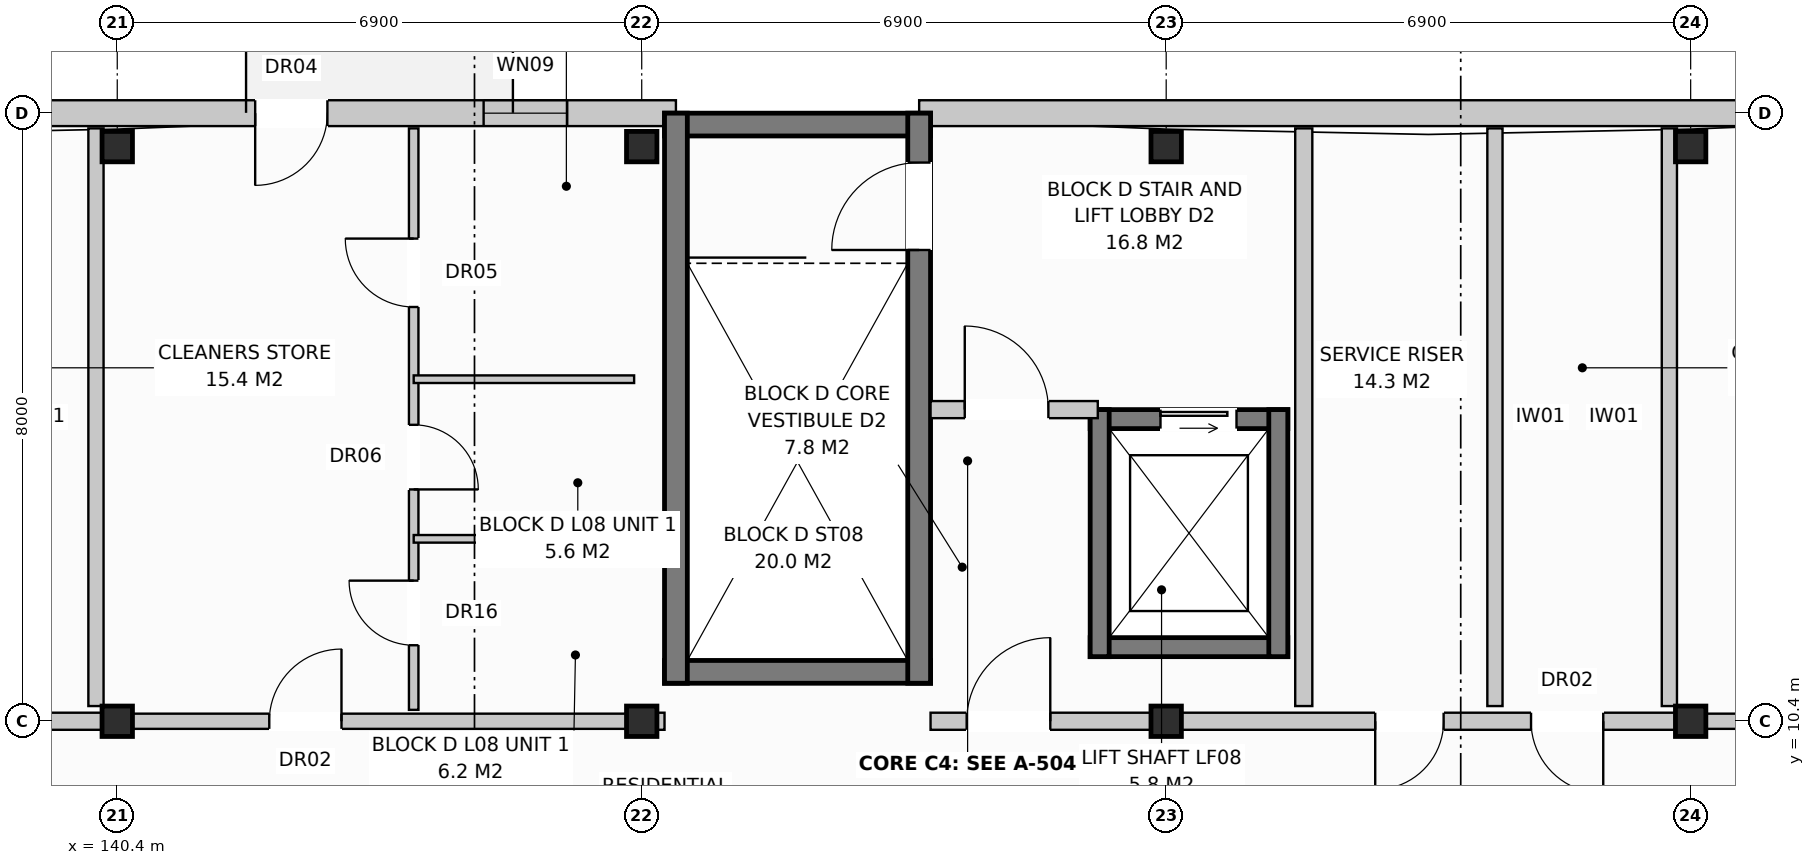
"""IFC4 building model, lengths in metres.
Left out: names, types, materials, properties, quantities, classifications, styles, units other than length and angle.
Written with IfcOpenShell. Run it as: python <this file> out.ifc"""

import sys

from ifc_helpers import new_model, si_unit, direction, frame, frame_2d, origin, origin_with_axes, origin_2d, place, context, subcontext, project, spatial, rectangle, extrude, element, fill, save


model = new_model("IFC4")
c1 = context("Model", 3, precision=1e-05, world=origin(), true_north=direction((0.0, 1.0)))
c2 = subcontext(c1, "Body", "Model", "MODEL_VIEW")
j1 = project(units=[si_unit("LENGTHUNIT", "METRE"), si_unit("PLANEANGLEUNIT", "RADIAN")], contexts=[c1])
p1 = place(None, origin())
s1 = spatial("IfcSite", under=j1, at=p1, CompositionType="ELEMENT")
p2 = place(p1, origin())
s2 = spatial("IfcBuilding", under=s1, at=p2, CompositionType="ELEMENT")
p3 = place(p2, frame((0.0, 0.0, 27.2)))
s3 = spatial("IfcBuildingStorey", under=s2, at=p3, CompositionType="ELEMENT", Elevation=27.2)
for number, where, z_axis, x_axis in (
    (1, (140.4, 10.4, 0.0), (0.0, 0.0, 1.0), (1.0, 0.0, 0.0)),
    (2, (140.4, 17.96, 0.0), (0.0, 0.0, 1.0), (1.0, 0.0, 0.0)),
    (3, (147.3, 10.4, 0.0), (0.0, 0.0, 1.0), (1.0, 0.0, 0.0)),
    (4, (147.3, 17.96, 0.0), (0.0, 0.0, 1.0), (1.0, 0.0, 0.0)),
    (5, (154.2, 10.4, 0.0), (0.0, 0.0, 1.0), (1.0, 0.0, 0.0)),
    (6, (154.2, 17.96, 0.0), (0.0, 0.0, 1.0), (1.0, 0.0, 0.0)),
    (7, (161.1, 10.4, 0.0), (0.0, 0.0, 1.0), (1.0, 0.0, 0.0)),
    (8, (161.1, 17.96, 0.0), (0.0, 0.0, 1.0), (1.0, 0.0, 0.0)),
):
    element("IfcColumn", number, at=place(p3, frame(where, z_axis=z_axis, x_axis=x_axis)), inside=s3, PredefinedType="COLUMN", context=c2, shape_type="SweptSolid", body=[
        extrude(rectangle(XDim=0.4, YDim=0.4, at=origin_2d()), origin(), (0.0, 0.0, 1.0), 3.2),
    ])
p4 = place(p3, frame((130.25, 18.4, 0.0), z_axis=(0.0, 0.0, 1.0), x_axis=(1.0, 0.0, 0.0)))
e9 = element("IfcWall", 9, at=p4, inside=s3, PredefinedType="STANDARD", context=c2, shape_type="SweptSolid", body=[
    extrude(rectangle(XDim=17.5, YDim=0.34, at=frame_2d((8.75, 0.0))), origin(), (0.0, 0.0, 1.0), 2.91),
])
p5 = place(p4, frame((11.965, 0.0, 0.0)))
e10 = element("IfcOpeningElement", 10, at=p5, cuts=e9, PredefinedType="OPENING", context=c2, shape_type="SweptSolid", body=[
    extrude(rectangle(XDim=0.95, YDim=2.1, at=frame_2d((0.475, 1.05))), frame((0.0, 0.182, 0.0), z_axis=(0.0, -1.0, 0.0), x_axis=(1.0, 0.0, 0.0)), (0.0, 0.0, 1.0), 0.364),
])
p6 = place(p4, frame((14.97, 0.0, 0.72)))
e11 = element("IfcOpeningElement", 11, at=p6, cuts=e9, PredefinedType="OPENING", context=c2, shape_type="SweptSolid", body=[
    extrude(rectangle(XDim=1.1, YDim=1.5, at=frame_2d((0.55, 0.75))), frame((0.0, 0.182, 0.0), z_axis=(0.0, -1.0, 0.0), x_axis=(1.0, 0.0, 0.0)), (0.0, 0.0, 1.0), 0.364),
])
p7 = place(p3, frame((150.95, 18.4, 0.0), z_axis=(0.0, 0.0, 1.0), x_axis=(1.0, 0.0, 0.0)))
e12 = element("IfcWall", 12, at=p7, inside=s3, PredefinedType="STANDARD", context=c2, shape_type="SweptSolid", body=[
    extrude(rectangle(XDim=16.89, YDim=0.34, at=frame_2d((8.445, 0.0))), origin(), (0.0, 0.0, 1.0), 2.91),
])
p8 = place(p7, frame((11.57, 0.0, 0.72)))
e13 = element("IfcOpeningElement", 13, at=p8, cuts=e12, PredefinedType="OPENING", context=c2, shape_type="SweptSolid", body=[
    extrude(rectangle(XDim=1.1, YDim=1.5, at=frame_2d((0.55, 0.75))), frame((0.0, 0.182, 0.0), z_axis=(0.0, -1.0, 0.0), x_axis=(1.0, 0.0, 0.0)), (0.0, 0.0, 1.0), 0.364),
])
p9 = place(p7, frame((14.335, 0.0, 0.8)))
e14 = element("IfcOpeningElement", 14, at=p9, cuts=e12, PredefinedType="OPENING", context=c2, shape_type="SweptSolid", body=[
    extrude(rectangle(XDim=1.95, YDim=1.65, at=frame_2d((0.975, 0.825))), frame((0.0, 0.182, 0.0), z_axis=(0.0, -1.0, 0.0), x_axis=(1.0, 0.0, 0.0)), (0.0, 0.0, 1.0), 0.364),
])
p10 = place(p3, frame((140.12, 10.6, 0.0), z_axis=(0.0, 0.0, 1.0), x_axis=(0.0, 1.0, 0.0)))
e15 = element("IfcWall", 15, at=p10, inside=s3, PredefinedType="PARTITIONING", context=c2, shape_type="SweptSolid", body=[
    extrude(rectangle(XDim=7.6, YDim=0.2, at=frame_2d((3.8, 0.0))), origin(), (0.0, 0.0, 1.0), 2.96),
])
p11 = place(p3, frame((130.4, 10.4, 0.0), z_axis=(0.0, 0.0, 1.0), x_axis=(1.0, 0.0, 0.0)))
e16 = element("IfcWall", 16, at=p11, inside=s3, PredefinedType="PARTITIONING", context=c2, shape_type="SweptSolid", body=[
    extrude(rectangle(XDim=10.0, YDim=0.225, at=frame_2d((5.0, 0.0))), origin(), (0.0, 0.0, 1.0), 2.35),
])
p12 = place(p11, frame((0.475, 0.0, 0.0)))
e17 = element("IfcOpeningElement", 17, at=p12, cuts=e16, PredefinedType="OPENING", context=c2, shape_type="SweptSolid", body=[
    extrude(rectangle(XDim=1.1, YDim=2.15, at=frame_2d((0.55, 1.075))), frame((0.0, 0.125, 0.0), z_axis=(0.0, -1.0, 0.0), x_axis=(1.0, 0.0, 0.0)), (0.0, 0.0, 1.0), 0.249),
])
p13 = place(p11, frame((5.85, 0.0, 0.0)))
e18 = element("IfcOpeningElement", 18, at=p13, cuts=e16, PredefinedType="OPENING", context=c2, shape_type="SweptSolid", body=[
    extrude(rectangle(XDim=0.9, YDim=2.1, at=frame_2d((0.45, 1.05))), frame((0.0, 0.125, 0.0), z_axis=(0.0, -1.0, 0.0), x_axis=(1.0, 0.0, 0.0)), (0.0, 0.0, 1.0), 0.249),
])
p14 = place(p11, frame((7.9, 0.0, 0.0)))
e19 = element("IfcOpeningElement", 19, at=p14, cuts=e16, PredefinedType="OPENING", context=c2, shape_type="SweptSolid", body=[
    extrude(rectangle(XDim=0.95, YDim=2.15, at=frame_2d((0.475, 1.075))), frame((0.0, 0.125, 0.0), z_axis=(0.0, -1.0, 0.0), x_axis=(1.0, 0.0, 0.0)), (0.0, 0.0, 1.0), 0.249),
])
for number, where, z_axis, x_axis in (
    (20, (147.6, 18.25, 0.0), (0.0, 0.0, 1.0), (1.0, 0.0, 0.0)),
    (21, (147.6, 11.05, 0.0), (0.0, 0.0, 1.0), (1.0, 0.0, 0.0)),
):
    element("IfcWall", number, at=place(p3, frame(where, z_axis=z_axis, x_axis=x_axis)), inside=s3, PredefinedType="SHEAR", context=c2, shape_type="SweptSolid", body=[
        extrude(rectangle(XDim=3.5, YDim=0.3, at=frame_2d((1.75, 0.0))), origin(), (0.0, 0.0, 1.0), 2.96),
    ])
p15 = place(p3, frame((147.75, 10.9, 0.0), z_axis=(0.0, 0.0, 1.0), x_axis=(0.0, 1.0, 0.0)))
e22 = element("IfcWall", 22, at=p15, inside=s3, PredefinedType="SHEAR", context=c2, shape_type="SweptSolid", body=[
    extrude(rectangle(XDim=7.5, YDim=0.3, at=frame_2d((3.75, 0.0))), origin(), (0.0, 0.0, 1.0), 2.96),
])
p16 = place(p3, frame((150.95, 10.9, 0.0), z_axis=(0.0, 0.0, 1.0), x_axis=(0.0, 1.0, 0.0)))
e23 = element("IfcWall", 23, at=p16, inside=s3, PredefinedType="SHEAR", context=c2, shape_type="SweptSolid", body=[
    extrude(rectangle(XDim=7.5, YDim=0.3, at=frame_2d((3.75, 0.0))), origin(), (0.0, 0.0, 1.0), 2.96),
])
p17 = place(p16, frame((5.7, 0.0, 0.0)))
e24 = element("IfcOpeningElement", 24, at=p17, cuts=e23, PredefinedType="OPENING", context=c2, shape_type="SweptSolid", body=[
    extrude(rectangle(XDim=1.15, YDim=2.15, at=frame_2d((0.575, 1.075))), frame((0.0, 0.162, 0.0), z_axis=(0.0, -1.0, 0.0), x_axis=(1.0, 0.0, 0.0)), (0.0, 0.0, 1.0), 0.324),
])
p18 = place(p3, frame((153.2, 14.375, 0.0), z_axis=(0.0, 0.0, 1.0), x_axis=(1.0, 0.0, 0.0)))
e25 = element("IfcWall", 25, at=p18, inside=s3, PredefinedType="SHEAR", context=c2, shape_type="SweptSolid", body=[
    extrude(rectangle(XDim=2.6, YDim=0.25, at=frame_2d((1.3, 0.0))), origin(), (0.0, 0.0, 1.0), 2.96),
])
p19 = place(p18, frame((0.925, 0.0, 0.0)))
e26 = element("IfcOpeningElement", 26, at=p19, cuts=e25, PredefinedType="OPENING", context=c2, shape_type="SweptSolid", body=[
    extrude(rectangle(XDim=1.0, YDim=2.1, at=frame_2d((0.5, 1.05))), frame((0.0, 0.137, 0.0), z_axis=(0.0, -1.0, 0.0), x_axis=(1.0, 0.0, 0.0)), (0.0, 0.0, 1.0), 0.274),
])
p20 = place(p3, frame((153.2, 11.375, 0.0), z_axis=(0.0, 0.0, 1.0), x_axis=(1.0, 0.0, 0.0)))
e27 = element("IfcWall", 27, at=p20, inside=s3, PredefinedType="SHEAR", context=c2, shape_type="SweptSolid", body=[
    extrude(rectangle(XDim=2.6, YDim=0.25, at=frame_2d((1.3, 0.0))), origin(), (0.0, 0.0, 1.0), 2.96),
])
for number, where, z_axis, x_axis in (
    (28, (153.325, 11.25, 0.0), (0.0, 0.0, 1.0), (0.0, 1.0, 0.0)),
    (29, (155.675, 11.25, 0.0), (0.0, 0.0, 1.0), (0.0, 1.0, 0.0)),
):
    element("IfcWall", number, at=place(p3, frame(where, z_axis=z_axis, x_axis=x_axis)), inside=s3, PredefinedType="SHEAR", context=c2, shape_type="SweptSolid", body=[
        extrude(rectangle(XDim=3.25, YDim=0.25, at=frame_2d((1.625, 0.0))), origin(), (0.0, 0.0, 1.0), 2.96),
    ])
p21 = place(p3, frame((156.01, 10.6, 0.0), z_axis=(0.0, 0.0, 1.0), x_axis=(0.0, 1.0, 0.0)))
e30 = element("IfcWall", 30, at=p21, inside=s3, PredefinedType="PARTITIONING", context=c2, shape_type="SweptSolid", body=[
    extrude(rectangle(XDim=7.6, YDim=0.225, at=frame_2d((3.8, 0.0))), origin(), (0.0, 0.0, 1.0), 2.59),
])
p22 = place(p3, frame((151.1, 14.5, 0.0), z_axis=(0.0, 0.0, 1.0), x_axis=(1.0, 0.0, 0.0)))
e31 = element("IfcWall", 31, at=p22, inside=s3, PredefinedType="PARTITIONING", context=c2, shape_type="SweptSolid", body=[
    extrude(rectangle(XDim=2.2, YDim=0.225, at=frame_2d((1.1, 0.0))), origin(), (0.0, 0.0, 1.0), 2.96),
])
p23 = place(p22, frame((0.45, 0.0, 0.0)))
e32 = element("IfcOpeningElement", 32, at=p23, cuts=e31, PredefinedType="OPENING", context=c2, shape_type="SweptSolid", body=[
    extrude(rectangle(XDim=1.1, YDim=2.15, at=frame_2d((0.55, 1.075))), frame((0.0, 0.125, 0.0), z_axis=(0.0, -1.0, 0.0), x_axis=(1.0, 0.0, 0.0)), (0.0, 0.0, 1.0), 0.249),
])
p24 = place(p3, frame((147.3, 10.4, 0.0), z_axis=(0.0, 0.0, 1.0), x_axis=(1.0, 0.0, 0.0)))
e33 = element("IfcWall", 33, at=p24, inside=s3, PredefinedType="PARTITIONING", context=c2, shape_type="SweptSolid", body=[
    extrude(rectangle(XDim=0.3, YDim=0.225, at=frame_2d((0.15, 0.0))), origin(), (0.0, 0.0, 1.0), 2.96),
])
p25 = place(p3, frame((158.525, 10.6, 0.0), z_axis=(0.0, 0.0, 1.0), x_axis=(0.0, 1.0, 0.0)))
e34 = element("IfcWall", 34, at=p25, inside=s3, PredefinedType="PARTITIONING", context=c2, shape_type="SweptSolid", body=[
    extrude(rectangle(XDim=7.6, YDim=0.2, at=frame_2d((3.8, 0.0))), origin(), (0.0, 0.0, 1.0), 2.96),
])
p26 = place(p3, frame((160.82, 10.6, 0.0), z_axis=(0.0, 0.0, 1.0), x_axis=(0.0, 1.0, 0.0)))
e35 = element("IfcWall", 35, at=p26, inside=s3, PredefinedType="PARTITIONING", context=c2, shape_type="SweptSolid", body=[
    extrude(rectangle(XDim=7.6, YDim=0.2, at=frame_2d((3.8, 0.0))), origin(), (0.0, 0.0, 1.0), 2.35),
])
p27 = place(p3, frame((151.1, 10.4, 0.0), z_axis=(0.0, 0.0, 1.0), x_axis=(1.0, 0.0, 0.0)))
e36 = element("IfcWall", 36, at=p27, inside=s3, PredefinedType="PARTITIONING", context=c2, shape_type="SweptSolid", body=[
    extrude(rectangle(XDim=10.0, YDim=0.225, at=frame_2d((5.0, 0.0))), origin(), (0.0, 0.0, 1.0), 2.35),
])
p28 = place(p27, frame((0.475, 0.0, 0.0)))
e37 = element("IfcOpeningElement", 37, at=p28, cuts=e36, PredefinedType="OPENING", context=c2, shape_type="SweptSolid", body=[
    extrude(rectangle(XDim=1.1, YDim=2.15, at=frame_2d((0.55, 1.075))), frame((0.0, 0.125, 0.0), z_axis=(0.0, -1.0, 0.0), x_axis=(1.0, 0.0, 0.0)), (0.0, 0.0, 1.0), 0.249),
])
p29 = place(p27, frame((5.85, 0.0, 0.0)))
e38 = element("IfcOpeningElement", 38, at=p29, cuts=e36, PredefinedType="OPENING", context=c2, shape_type="SweptSolid", body=[
    extrude(rectangle(XDim=0.9, YDim=2.1, at=frame_2d((0.45, 1.05))), frame((0.0, 0.125, 0.0), z_axis=(0.0, -1.0, 0.0), x_axis=(1.0, 0.0, 0.0)), (0.0, 0.0, 1.0), 0.249),
])
p30 = place(p27, frame((7.9, 0.0, 0.0)))
e39 = element("IfcOpeningElement", 39, at=p30, cuts=e36, PredefinedType="OPENING", context=c2, shape_type="SweptSolid", body=[
    extrude(rectangle(XDim=0.95, YDim=2.15, at=frame_2d((0.475, 1.075))), frame((0.0, 0.125, 0.0), z_axis=(0.0, -1.0, 0.0), x_axis=(1.0, 0.0, 0.0)), (0.0, 0.0, 1.0), 0.249),
])
p31 = place(p3, frame((140.4, 10.4, 0.0), z_axis=(0.0, 0.0, 1.0), x_axis=(1.0, 0.0, 0.0)))
e40 = element("IfcWall", 40, at=p31, inside=s3, PredefinedType="PARTITIONING", context=c2, shape_type="SweptSolid", body=[
    extrude(rectangle(XDim=6.9, YDim=0.2, at=frame_2d((3.45, 0.0))), origin(), (0.0, 0.0, 1.0), 2.35),
])
p32 = place(p31, frame((2.0, 0.0, 0.0)))
e41 = element("IfcOpeningElement", 41, at=p32, cuts=e40, PredefinedType="OPENING", context=c2, shape_type="SweptSolid", body=[
    extrude(rectangle(XDim=0.95, YDim=2.15, at=frame_2d((0.475, 1.075))), frame((0.0, 0.112, 0.0), z_axis=(0.0, -1.0, 0.0), x_axis=(1.0, 0.0, 0.0)), (0.0, 0.0, 1.0), 0.224),
])
p33 = place(p3, frame((144.3, 10.55, 0.0), z_axis=(0.0, 0.0, 1.0), x_axis=(0.0, 1.0, 0.0)))
e42 = element("IfcWall", 42, at=p33, inside=s3, PredefinedType="PARTITIONING", context=c2, shape_type="SweptSolid", body=[
    extrude(rectangle(XDim=7.65, YDim=0.125, at=frame_2d((3.825, 0.0))), origin(), (0.0, 0.0, 1.0), 2.96),
])
p34 = place(p33, frame((0.85, 0.0, 0.0)))
e43 = element("IfcOpeningElement", 43, at=p34, cuts=e42, PredefinedType="OPENING", context=c2, shape_type="SweptSolid", body=[
    extrude(rectangle(XDim=0.85, YDim=2.1, at=frame_2d((0.425, 1.05))), frame((0.0, 0.074, 0.0), z_axis=(0.0, -1.0, 0.0), x_axis=(1.0, 0.0, 0.0)), (0.0, 0.0, 1.0), 0.149),
])
p35 = place(p33, frame((2.9, 0.0, 0.0)))
e44 = element("IfcOpeningElement", 44, at=p35, cuts=e42, PredefinedType="OPENING", context=c2, shape_type="SweptSolid", body=[
    extrude(rectangle(XDim=0.85, YDim=2.05, at=frame_2d((0.425, 1.025))), frame((0.0, 0.074, 0.0), z_axis=(0.0, -1.0, 0.0), x_axis=(1.0, 0.0, 0.0)), (0.0, 0.0, 1.0), 0.149),
])
p36 = place(p33, frame((5.3, 0.0, 0.0)))
e45 = element("IfcOpeningElement", 45, at=p36, cuts=e42, PredefinedType="OPENING", context=c2, shape_type="SweptSolid", body=[
    extrude(rectangle(XDim=0.9, YDim=2.1, at=frame_2d((0.45, 1.05))), frame((0.0, 0.074, 0.0), z_axis=(0.0, -1.0, 0.0), x_axis=(1.0, 0.0, 0.0)), (0.0, 0.0, 1.0), 0.149),
])
for number, where, z_axis, x_axis in (
    (46, (144.3, 12.8, 0.0), (0.0, 0.0, 1.0), (1.0, 0.0, 0.0)),
    (47, (144.3, 14.9, 0.0), (0.0, 0.0, 1.0), (1.0, 0.0, 0.0)),
):
    element("IfcWall", number, at=place(p3, frame(where, z_axis=z_axis, x_axis=x_axis)), inside=s3, PredefinedType="PARTITIONING", context=c2, shape_type="SweptSolid", body=[
        extrude(rectangle(XDim=2.9, YDim=0.1, at=frame_2d((1.45, 0.0))), origin(), (0.0, 0.0, 1.0), 2.96),
    ])
p37 = place(p3, frame((161.1, 10.4, 0.0), z_axis=(0.0, 0.0, 1.0), x_axis=(1.0, 0.0, 0.0)))
e48 = element("IfcWall", 48, at=p37, inside=s3, PredefinedType="PARTITIONING", context=c2, shape_type="SweptSolid", body=[
    extrude(rectangle(XDim=6.9, YDim=0.2, at=frame_2d((3.45, 0.0))), origin(), (0.0, 0.0, 1.0), 2.35),
])
p38 = place(p37, frame((2.0, 0.0, 0.0)))
e49 = element("IfcOpeningElement", 49, at=p38, cuts=e48, PredefinedType="OPENING", context=c2, shape_type="SweptSolid", body=[
    extrude(rectangle(XDim=0.95, YDim=2.15, at=frame_2d((0.475, 1.075))), frame((0.0, 0.112, 0.0), z_axis=(0.0, -1.0, 0.0), x_axis=(1.0, 0.0, 0.0)), (0.0, 0.0, 1.0), 0.224),
])
p39 = place(p5, frame((0.95, 0.0, 0.0), z_axis=(0.0, 0.0, 1.0), x_axis=(-1.0, 0.0, 0.0)))
e50 = element("IfcDoor", 50, at=p39, inside=s3, OperationType="SINGLE_SWING_LEFT", PredefinedType="DOOR", context=c2, shape_type="SweptSolid", body=[
    extrude(rectangle(XDim=0.95, YDim=2.1, at=frame_2d((0.475, 1.05))), frame((0.0, 0.025, 0.0), z_axis=(0.0, -1.0, 0.0), x_axis=(1.0, 0.0, 0.0)), (0.0, 0.0, 1.0), 0.05),
])
fill(e10, e50)
p40 = place(p6, origin_with_axes())
e51 = element("IfcWindow", 51, at=p40, inside=s3, PartitioningType="SINGLE_PANEL", PredefinedType="WINDOW", context=c2, shape_type="SweptSolid", body=[
    extrude(rectangle(XDim=1.1, YDim=1.5, at=frame_2d((0.55, 0.75))), frame((0.0, 0.03, 0.0), z_axis=(0.0, -1.0, 0.0), x_axis=(1.0, 0.0, 0.0)), (0.0, 0.0, 1.0), 0.06),
])
fill(e11, e51)
p41 = place(p17, origin_with_axes())
e52 = element("IfcDoor", 52, at=p41, inside=s3, OperationType="SINGLE_SWING_LEFT", PredefinedType="DOOR", context=c2, shape_type="SweptSolid", body=[
    extrude(rectangle(XDim=1.15, YDim=2.15, at=frame_2d((0.575, 1.075))), frame((0.0, 0.025, 0.0), z_axis=(0.0, -1.0, 0.0), x_axis=(1.0, 0.0, 0.0)), (0.0, 0.0, 1.0), 0.05),
])
fill(e24, e52)
p42 = place(p19, origin_with_axes())
e53 = element("IfcDoor", 53, at=p42, inside=s3, OperationType="SLIDING_TO_LEFT", PredefinedType="DOOR", context=c2, shape_type="SweptSolid", body=[
    extrude(rectangle(XDim=1.0, YDim=2.1, at=frame_2d((0.5, 1.05))), frame((0.0, 0.025, 0.0), z_axis=(0.0, -1.0, 0.0), x_axis=(1.0, 0.0, 0.0)), (0.0, 0.0, 1.0), 0.05),
])
fill(e26, e53)
p43 = place(p23, origin_with_axes())
e54 = element("IfcDoor", 54, at=p43, inside=s3, OperationType="SINGLE_SWING_LEFT", PredefinedType="DOOR", context=c2, shape_type="SweptSolid", body=[
    extrude(rectangle(XDim=1.1, YDim=2.15, at=frame_2d((0.55, 1.075))), frame((0.0, 0.025, 0.0), z_axis=(0.0, -1.0, 0.0), x_axis=(1.0, 0.0, 0.0)), (0.0, 0.0, 1.0), 0.05),
])
fill(e32, e54)
p44 = place(p28, origin_with_axes())
e55 = element("IfcDoor", 55, at=p44, inside=s3, OperationType="SINGLE_SWING_RIGHT", PredefinedType="DOOR", context=c2, shape_type="SweptSolid", body=[
    extrude(rectangle(XDim=1.1, YDim=2.15, at=frame_2d((0.55, 1.075))), frame((0.0, 0.025, 0.0), z_axis=(0.0, -1.0, 0.0), x_axis=(1.0, 0.0, 0.0)), (0.0, 0.0, 1.0), 0.05),
])
fill(e37, e55)
p45 = place(p29, frame((0.9, 0.0, 0.0), z_axis=(0.0, 0.0, 1.0), x_axis=(-1.0, 0.0, 0.0)))
e56 = element("IfcDoor", 56, at=p45, inside=s3, OperationType="SINGLE_SWING_LEFT", PredefinedType="DOOR", context=c2, shape_type="SweptSolid", body=[
    extrude(rectangle(XDim=0.9, YDim=2.1, at=frame_2d((0.45, 1.05))), frame((0.0, 0.025, 0.0), z_axis=(0.0, -1.0, 0.0), x_axis=(1.0, 0.0, 0.0)), (0.0, 0.0, 1.0), 0.05),
])
fill(e38, e56)
p46 = place(p30, frame((0.95, 0.0, 0.0), z_axis=(0.0, 0.0, 1.0), x_axis=(-1.0, 0.0, 0.0)))
e57 = element("IfcDoor", 57, at=p46, inside=s3, OperationType="SINGLE_SWING_RIGHT", PredefinedType="DOOR", context=c2, shape_type="SweptSolid", body=[
    extrude(rectangle(XDim=0.95, YDim=2.15, at=frame_2d((0.475, 1.075))), frame((0.0, 0.025, 0.0), z_axis=(0.0, -1.0, 0.0), x_axis=(1.0, 0.0, 0.0)), (0.0, 0.0, 1.0), 0.05),
])
fill(e39, e57)
p47 = place(p32, origin_with_axes())
e58 = element("IfcDoor", 58, at=p47, inside=s3, OperationType="SINGLE_SWING_RIGHT", PredefinedType="DOOR", context=c2, shape_type="SweptSolid", body=[
    extrude(rectangle(XDim=0.95, YDim=2.15, at=frame_2d((0.475, 1.075))), frame((0.0, 0.025, 0.0), z_axis=(0.0, -1.0, 0.0), x_axis=(1.0, 0.0, 0.0)), (0.0, 0.0, 1.0), 0.05),
])
fill(e41, e58)
p48 = place(p34, origin_with_axes())
e59 = element("IfcDoor", 59, at=p48, inside=s3, OperationType="SINGLE_SWING_RIGHT", PredefinedType="DOOR", context=c2, shape_type="SweptSolid", body=[
    extrude(rectangle(XDim=0.85, YDim=2.1, at=frame_2d((0.425, 1.05))), frame((0.0, 0.025, 0.0), z_axis=(0.0, -1.0, 0.0), x_axis=(1.0, 0.0, 0.0)), (0.0, 0.0, 1.0), 0.05),
])
fill(e43, e59)
p49 = place(p35, frame((0.85, 0.0, 0.0), z_axis=(0.0, 0.0, 1.0), x_axis=(-1.0, 0.0, 0.0)))
e60 = element("IfcDoor", 60, at=p49, inside=s3, OperationType="SINGLE_SWING_LEFT", PredefinedType="DOOR", context=c2, shape_type="SweptSolid", body=[
    extrude(rectangle(XDim=0.85, YDim=2.05, at=frame_2d((0.425, 1.025))), frame((0.0, 0.025, 0.0), z_axis=(0.0, -1.0, 0.0), x_axis=(1.0, 0.0, 0.0)), (0.0, 0.0, 1.0), 0.05),
])
fill(e44, e60)
p50 = place(p36, origin_with_axes())
e61 = element("IfcDoor", 61, at=p50, inside=s3, OperationType="SINGLE_SWING_RIGHT", PredefinedType="DOOR", context=c2, shape_type="SweptSolid", body=[
    extrude(rectangle(XDim=0.9, YDim=2.1, at=frame_2d((0.45, 1.05))), frame((0.0, 0.025, 0.0), z_axis=(0.0, -1.0, 0.0), x_axis=(1.0, 0.0, 0.0)), (0.0, 0.0, 1.0), 0.05),
])
fill(e45, e61)
save(model, sys.argv[1])
